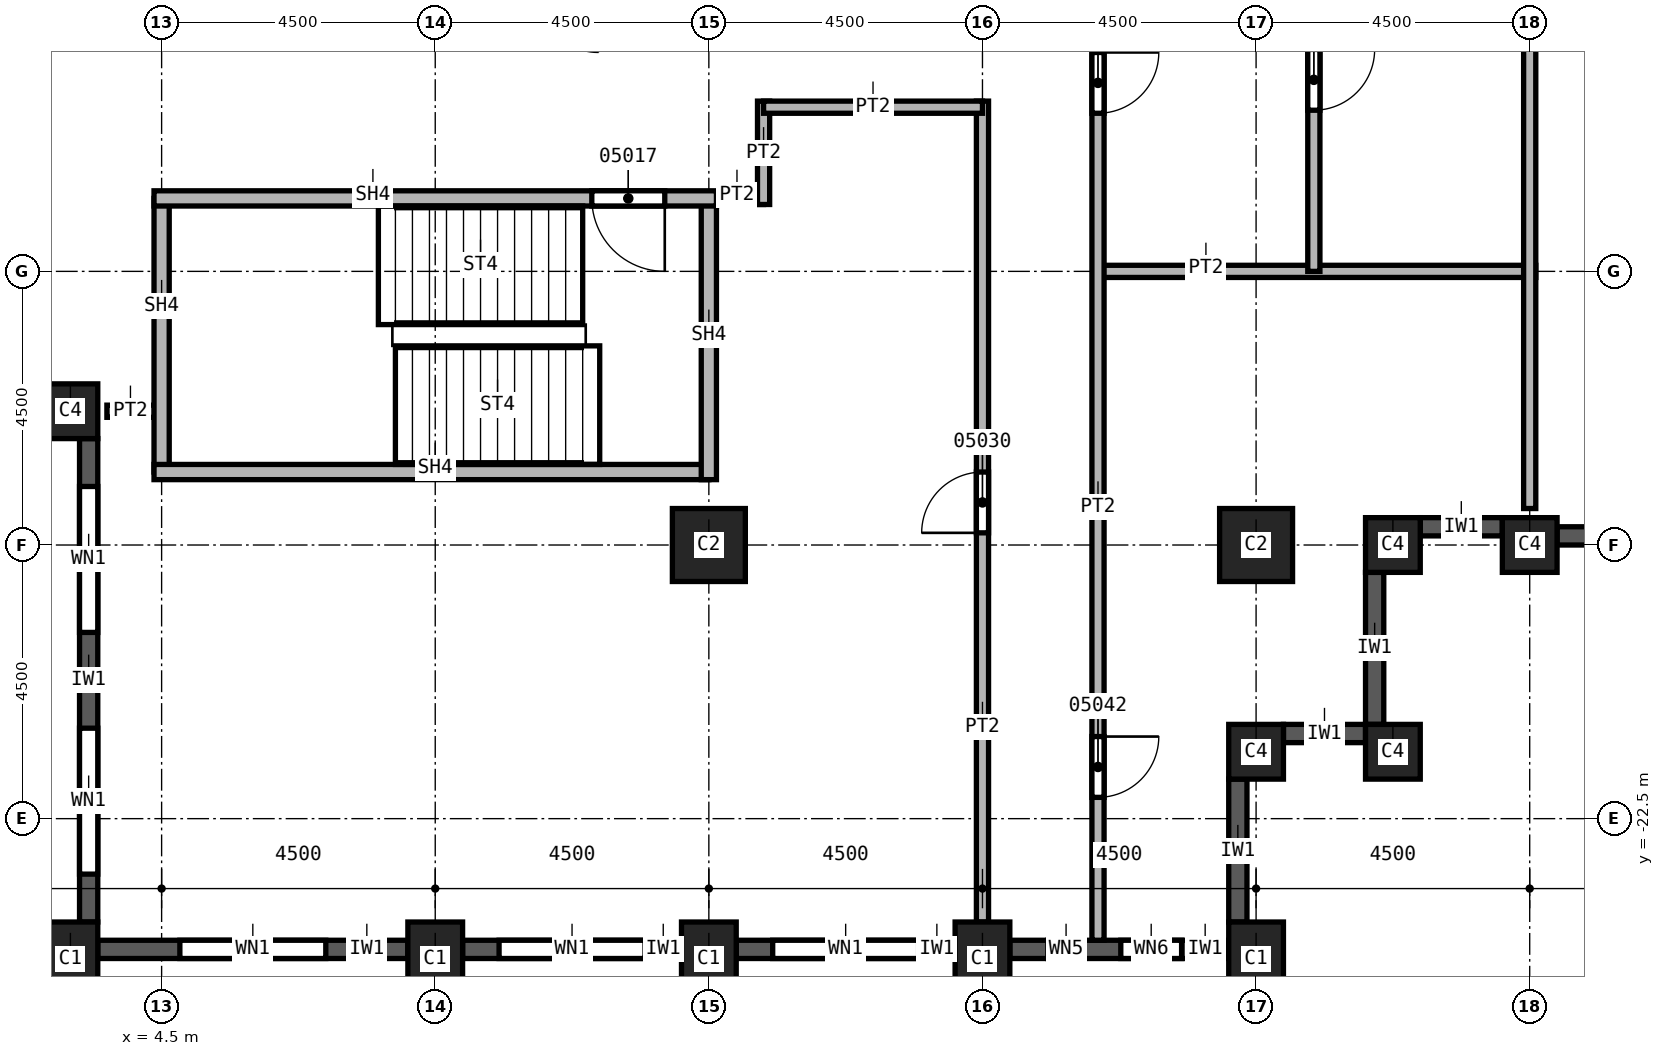
"""IFC4 building model, lengths in metres.
Left out: names, types, materials, properties, quantities, classifications, styles, units other than length and angle.
Written with IfcOpenShell. Run it as: python <this file> out.ifc"""

import sys

from ifc_helpers import new_model, si_unit, direction, frame, frame_2d, origin, origin_2d, place, context, subcontext, project, spatial, rectangle, extrude, element, fill, save


model = new_model("IFC4")
c1 = context("Model", 3, precision=1e-05, world=origin(), true_north=direction((0.0, 1.0)))
c2 = subcontext(c1, "Body", "Model", "MODEL_VIEW")
j1 = project(units=[si_unit("LENGTHUNIT", "METRE"), si_unit("PLANEANGLEUNIT", "RADIAN")], contexts=[c1])
p1 = place(None, origin())
s1 = spatial("IfcSite", under=j1, at=p1, CompositionType="ELEMENT")
p2 = place(p1, origin())
s2 = spatial("IfcBuilding", under=s1, at=p2, CompositionType="ELEMENT")
p3 = place(p2, frame((0.0, 0.0, 112.0)))
s3 = spatial("IfcBuildingStorey", under=s2, at=p3, CompositionType="ELEMENT", Elevation=112.0)
for number, where, z_axis, x_axis in (
    (1, (13.5, -18.0, 0.0), (0.0, 0.0, 1.0), (1.0, 0.0, 0.0)),
    (2, (22.5, -18.0, 0.0), (0.0, 0.0, 1.0), (1.0, 0.0, 0.0)),
):
    element("IfcColumn", number, at=place(p3, frame(where, z_axis=z_axis, x_axis=x_axis)), inside=s3, PredefinedType="COLUMN", context=c2, shape_type="SweptSolid", body=[
        extrude(rectangle(XDim=1.2, YDim=1.2, at=origin_2d()), origin(), (0.0, 0.0, 1.0), 3.7),
    ])
p4 = place(p3, frame((27.0, -18.0, 0.0), z_axis=(0.0, 0.0, 1.0), x_axis=(1.0, 0.0, 0.0)))
e3 = element("IfcColumn", 3, at=p4, inside=s3, PredefinedType="COLUMN", context=c2, shape_type="SweptSolid", body=[
    extrude(rectangle(XDim=0.9, YDim=0.9, at=origin_2d()), origin(), (0.0, 0.0, 1.0), 3.7),
])
for number, where, z_axis, x_axis in (
    (4, (3.0, -24.8, 0.0), (0.0, 0.0, 1.0), (1.0, 0.0, 0.0)),
    (5, (9.0, -24.8, 0.0), (0.0, 0.0, 1.0), (1.0, 0.0, 0.0)),
    (6, (13.5, -24.8, 0.0), (0.0, 0.0, 1.0), (1.0, 0.0, 0.0)),
    (7, (18.0, -24.8, 0.0), (0.0, 0.0, 1.0), (1.0, 0.0, 0.0)),
    (8, (22.5, -24.8, 0.0), (0.0, 0.0, 1.0), (1.0, 0.0, 0.0)),
):
    element("IfcColumn", number, at=place(p3, frame(where, z_axis=z_axis, x_axis=x_axis)), inside=s3, PredefinedType="COLUMN", context=c2, shape_type="SweptSolid", body=[
        extrude(rectangle(XDim=0.9, YDim=1.2, at=origin_2d()), origin(), (0.0, 0.0, 1.0), 3.7),
    ])
for number, where, z_axis, x_axis in (
    (9, (3.0, -15.8, 0.0), (0.0, 0.0, 1.0), (1.0, 0.0, 0.0)),
    (10, (22.5, -21.4, 0.0), (0.0, 0.0, 1.0), (1.0, 0.0, 0.0)),
    (11, (24.75, -21.4, 0.0), (0.0, 0.0, 1.0), (1.0, 0.0, 0.0)),
    (12, (24.75, -18.0, 0.0), (0.0, 0.0, 1.0), (1.0, 0.0, 0.0)),
):
    element("IfcColumn", number, at=place(p3, frame(where, z_axis=z_axis, x_axis=x_axis)), inside=s3, PredefinedType="COLUMN", context=c2, shape_type="SweptSolid", body=[
        extrude(rectangle(XDim=0.9, YDim=0.9, at=origin_2d()), origin(), (0.0, 0.0, 1.0), 3.7),
    ])
p5 = place(p3, frame((3.3, -16.25, 0.0), z_axis=(0.0, 0.0, 1.0), x_axis=(0.0, -1.0, 0.0)))
e13 = element("IfcWall", 13, at=p5, inside=s3, PredefinedType="SOLIDWALL", context=c2, shape_type="SweptSolid", body=[
    extrude(rectangle(XDim=7.95, YDim=0.3, at=frame_2d((3.975, 0.0))), origin(), (0.0, 0.0, 1.0), 3.1),
])
p6 = place(p5, frame((0.788, 0.0, 0.8)))
e14 = element("IfcOpeningElement", 14, at=p6, cuts=e13, PredefinedType="OPENING", context=c2, shape_type="SweptSolid", body=[
    extrude(rectangle(XDim=2.4, YDim=1.95, at=frame_2d((1.2, 0.975))), frame((0.0, 0.15, 0.0), z_axis=(0.0, -1.0, 0.0), x_axis=(1.0, 0.0, 0.0)), (0.0, 0.0, 1.0), 0.3),
])
p7 = place(p5, frame((4.762, 0.0, 0.8)))
e15 = element("IfcOpeningElement", 15, at=p7, cuts=e13, PredefinedType="OPENING", context=c2, shape_type="SweptSolid", body=[
    extrude(rectangle(XDim=2.4, YDim=1.95, at=frame_2d((1.2, 0.975))), frame((0.0, 0.15, 0.0), z_axis=(0.0, -1.0, 0.0), x_axis=(1.0, 0.0, 0.0)), (0.0, 0.0, 1.0), 0.3),
])
p8 = place(p3, frame((3.45, -24.65, 0.0), z_axis=(0.0, 0.0, 1.0), x_axis=(1.0, 0.0, 0.0)))
e16 = element("IfcWall", 16, at=p8, inside=s3, PredefinedType="SOLIDWALL", context=c2, shape_type="SweptSolid", body=[
    extrude(rectangle(XDim=5.1, YDim=0.3, at=frame_2d((2.55, 0.0))), origin(), (0.0, 0.0, 1.0), 3.1),
])
p9 = place(p8, frame((1.35, 0.0, 0.8)))
e17 = element("IfcOpeningElement", 17, at=p9, cuts=e16, PredefinedType="OPENING", context=c2, shape_type="SweptSolid", body=[
    extrude(rectangle(XDim=2.4, YDim=1.95, at=frame_2d((1.2, 0.975))), frame((0.0, 0.15, 0.0), z_axis=(0.0, -1.0, 0.0), x_axis=(1.0, 0.0, 0.0)), (0.0, 0.0, 1.0), 0.3),
])
p10 = place(p3, frame((9.45, -24.65, 0.0), z_axis=(0.0, 0.0, 1.0), x_axis=(1.0, 0.0, 0.0)))
e18 = element("IfcWall", 18, at=p10, inside=s3, PredefinedType="SOLIDWALL", context=c2, shape_type="SweptSolid", body=[
    extrude(rectangle(XDim=3.6, YDim=0.3, at=frame_2d((1.8, 0.0))), origin(), (0.0, 0.0, 1.0), 3.1),
])
p11 = place(p10, frame((0.6, 0.0, 0.8)))
e19 = element("IfcOpeningElement", 19, at=p11, cuts=e18, PredefinedType="OPENING", context=c2, shape_type="SweptSolid", body=[
    extrude(rectangle(XDim=2.4, YDim=1.95, at=frame_2d((1.2, 0.975))), frame((0.0, 0.15, 0.0), z_axis=(0.0, -1.0, 0.0), x_axis=(1.0, 0.0, 0.0)), (0.0, 0.0, 1.0), 0.3),
])
p12 = place(p3, frame((13.95, -24.65, 0.0), z_axis=(0.0, 0.0, 1.0), x_axis=(1.0, 0.0, 0.0)))
e20 = element("IfcWall", 20, at=p12, inside=s3, PredefinedType="SOLIDWALL", context=c2, shape_type="SweptSolid", body=[
    extrude(rectangle(XDim=3.6, YDim=0.3, at=frame_2d((1.8, 0.0))), origin(), (0.0, 0.0, 1.0), 3.1),
])
p13 = place(p12, frame((0.6, 0.0, 0.8)))
e21 = element("IfcOpeningElement", 21, at=p13, cuts=e20, PredefinedType="OPENING", context=c2, shape_type="SweptSolid", body=[
    extrude(rectangle(XDim=2.4, YDim=1.95, at=frame_2d((1.2, 0.975))), frame((0.0, 0.15, 0.0), z_axis=(0.0, -1.0, 0.0), x_axis=(1.0, 0.0, 0.0)), (0.0, 0.0, 1.0), 0.3),
])
p14 = place(p3, frame((18.45, -24.65, 0.0), z_axis=(0.0, 0.0, 1.0), x_axis=(1.0, 0.0, 0.0)))
e22 = element("IfcWall", 22, at=p14, inside=s3, PredefinedType="SOLIDWALL", context=c2, shape_type="SweptSolid", body=[
    extrude(rectangle(XDim=3.6, YDim=0.3, at=frame_2d((1.8, 0.0))), origin(), (0.0, 0.0, 1.0), 3.1),
])
p15 = place(p14, frame((0.625, 0.0, 0.8)))
e23 = element("IfcOpeningElement", 23, at=p15, cuts=e22, PredefinedType="OPENING", context=c2, shape_type="SweptSolid", body=[
    extrude(rectangle(XDim=0.6, YDim=1.95, at=frame_2d((0.3, 0.975))), frame((0.0, 0.15, 0.0), z_axis=(0.0, -1.0, 0.0), x_axis=(1.0, 0.0, 0.0)), (0.0, 0.0, 1.0), 0.3),
])
p16 = place(p14, frame((1.825, 0.0, 0.8)))
e24 = element("IfcOpeningElement", 24, at=p16, cuts=e22, PredefinedType="OPENING", context=c2, shape_type="SweptSolid", body=[
    extrude(rectangle(XDim=1.0, YDim=1.95, at=frame_2d((0.5, 0.975))), frame((0.0, 0.15, 0.0), z_axis=(0.0, -1.0, 0.0), x_axis=(1.0, 0.0, 0.0)), (0.0, 0.0, 1.0), 0.3),
])
p17 = place(p3, frame((22.2, -24.2, 0.0), z_axis=(0.0, 0.0, 1.0), x_axis=(0.0, 1.0, 0.0)))
e25 = element("IfcWall", 25, at=p17, inside=s3, PredefinedType="SOLIDWALL", context=c2, shape_type="SweptSolid", body=[
    extrude(rectangle(XDim=2.35, YDim=0.3, at=frame_2d((1.175, 0.0))), origin(), (0.0, 0.0, 1.0), 3.1),
])
p18 = place(p3, frame((22.95, -21.1, 0.0), z_axis=(0.0, 0.0, 1.0), x_axis=(1.0, 0.0, 0.0)))
e26 = element("IfcWall", 26, at=p18, inside=s3, PredefinedType="SOLIDWALL", context=c2, shape_type="SweptSolid", body=[
    extrude(rectangle(XDim=1.35, YDim=0.3, at=frame_2d((0.675, 0.0))), origin(), (0.0, 0.0, 1.0), 3.1),
])
p19 = place(p3, frame((24.45, -20.95, 0.0), z_axis=(0.0, 0.0, 1.0), x_axis=(0.0, 1.0, 0.0)))
e27 = element("IfcWall", 27, at=p19, inside=s3, PredefinedType="SOLIDWALL", context=c2, shape_type="SweptSolid", body=[
    extrude(rectangle(XDim=2.5, YDim=0.3, at=frame_2d((1.25, 0.0))), origin(), (0.0, 0.0, 1.0), 3.1),
])
p20 = place(p3, frame((25.2, -17.7, 0.0), z_axis=(0.0, 0.0, 1.0), x_axis=(1.0, 0.0, 0.0)))
e28 = element("IfcWall", 28, at=p20, inside=s3, PredefinedType="SOLIDWALL", context=c2, shape_type="SweptSolid", body=[
    extrude(rectangle(XDim=1.35, YDim=0.3, at=frame_2d((0.675, 0.0))), origin(), (0.0, 0.0, 1.0), 3.1),
])
p21 = place(p3, frame((27.45, -17.85, 0.0), z_axis=(0.0, 0.0, 1.0), x_axis=(1.0, 0.0, 0.0)))
e29 = element("IfcWall", 29, at=p21, inside=s3, PredefinedType="SOLIDWALL", context=c2, shape_type="SweptSolid", body=[
    extrude(rectangle(XDim=3.6, YDim=0.3, at=frame_2d((1.8, 0.0))), origin(), (0.0, 0.0, 1.0), 3.1),
])
p22 = place(p21, frame((0.6, 0.0, 0.8)))
e30 = element("IfcOpeningElement", 30, at=p22, cuts=e29, PredefinedType="OPENING", context=c2, shape_type="SweptSolid", body=[
    extrude(rectangle(XDim=2.4, YDim=1.95, at=frame_2d((1.2, 0.975))), frame((0.0, 0.15, 0.0), z_axis=(0.0, -1.0, 0.0), x_axis=(1.0, 0.0, 0.0)), (0.0, 0.0, 1.0), 0.3),
])
p23 = place(p3, frame((4.5, -15.8, 0.0), z_axis=(0.0, 0.0, 1.0), x_axis=(-1.0, 0.0, 0.0)))
e31 = element("IfcWall", 31, at=p23, inside=s3, PredefinedType="PARTITIONING", context=c2, shape_type="SweptSolid", body=[
    extrude(rectangle(XDim=0.9, YDim=0.2, at=frame_2d((0.45, 0.0))), origin(), (0.0, 0.0, 1.0), 3.7),
])
p24 = place(p3, frame((14.4, -12.3, 0.0), z_axis=(0.0, 0.0, 1.0), x_axis=(-1.0, 0.0, 0.0)))
e32 = element("IfcWall", 32, at=p24, inside=s3, PredefinedType="PARTITIONING", context=c2, shape_type="SweptSolid", body=[
    extrude(rectangle(XDim=1.025, YDim=0.2, at=frame_2d((0.512, 0.0))), origin(), (0.0, 0.0, 1.0), 3.7),
])
p25 = place(p3, frame((14.4, -10.7, 0.0), z_axis=(0.0, 0.0, 1.0), x_axis=(0.0, -1.0, 0.0)))
e33 = element("IfcWall", 33, at=p25, inside=s3, PredefinedType="PARTITIONING", context=c2, shape_type="SweptSolid", body=[
    extrude(rectangle(XDim=1.7, YDim=0.2, at=frame_2d((0.85, 0.0))), origin(), (0.0, 0.0, 1.0), 3.7),
])
p26 = place(p3, frame((18.0, -24.2, 0.0), z_axis=(0.0, 0.0, 1.0), x_axis=(0.0, 1.0, 0.0)))
e34 = element("IfcWall", 34, at=p26, inside=s3, PredefinedType="PARTITIONING", context=c2, shape_type="SweptSolid", body=[
    extrude(rectangle(XDim=13.5, YDim=0.2, at=frame_2d((6.75, 0.0))), origin(), (0.0, 0.0, 1.0), 3.7),
])
p27 = place(p26, frame((6.4, 0.0, 0.0)))
e35 = element("IfcOpeningElement", 35, at=p27, cuts=e34, PredefinedType="OPENING", context=c2, shape_type="SweptSolid", body=[
    extrude(rectangle(XDim=1.0, YDim=2.1, at=frame_2d((0.5, 1.05))), frame((0.0, 0.1, 0.0), z_axis=(0.0, -1.0, 0.0), x_axis=(1.0, 0.0, 0.0)), (0.0, 0.0, 1.0), 0.2),
])
p28 = place(p3, frame((18.0, -10.8, 0.0), z_axis=(0.0, 0.0, 1.0), x_axis=(-1.0, 0.0, 0.0)))
e36 = element("IfcWall", 36, at=p28, inside=s3, PredefinedType="PARTITIONING", context=c2, shape_type="SweptSolid", body=[
    extrude(rectangle(XDim=3.6, YDim=0.2, at=frame_2d((1.8, 0.0))), origin(), (0.0, 0.0, 1.0), 3.7),
])
p29 = place(p3, frame((19.9, -13.5, 0.0), z_axis=(0.0, 0.0, 1.0), x_axis=(1.0, 0.0, 0.0)))
e37 = element("IfcWall", 37, at=p29, inside=s3, PredefinedType="PARTITIONING", context=c2, shape_type="SweptSolid", body=[
    extrude(rectangle(XDim=7.2, YDim=0.2, at=frame_2d((3.6, 0.0))), origin(), (0.0, 0.0, 1.0), 3.7),
])
p30 = place(p3, frame((19.9, -3.65, 0.0), z_axis=(0.0, 0.0, 1.0), x_axis=(0.0, -1.0, 0.0)))
e38 = element("IfcWall", 38, at=p30, inside=s3, PredefinedType="PARTITIONING", context=c2, shape_type="SweptSolid", body=[
    extrude(rectangle(XDim=20.85, YDim=0.2, at=frame_2d((10.425, 0.0))), origin(), (0.0, 0.0, 1.0), 3.7),
])
p31 = place(p30, frame((17.5, 0.0, 0.0)))
e39 = element("IfcOpeningElement", 39, at=p31, cuts=e38, PredefinedType="OPENING", context=c2, shape_type="SweptSolid", body=[
    extrude(rectangle(XDim=1.0, YDim=2.1, at=frame_2d((0.5, 1.05))), frame((0.0, 0.1, 0.0), z_axis=(0.0, -1.0, 0.0), x_axis=(1.0, 0.0, 0.0)), (0.0, 0.0, 1.0), 0.2),
])
p32 = place(p30, frame((6.25, 0.0, 0.0)))
e40 = element("IfcOpeningElement", 40, at=p32, cuts=e38, PredefinedType="OPENING", context=c2, shape_type="SweptSolid", body=[
    extrude(rectangle(XDim=1.0, YDim=2.1, at=frame_2d((0.5, 1.05))), frame((0.0, 0.1, 0.0), z_axis=(0.0, -1.0, 0.0), x_axis=(1.0, 0.0, 0.0)), (0.0, 0.0, 1.0), 0.2),
])
p33 = place(p3, frame((23.45, -3.75, 0.0), z_axis=(0.0, 0.0, 1.0), x_axis=(0.0, -1.0, 0.0)))
e41 = element("IfcWall", 41, at=p33, inside=s3, PredefinedType="PARTITIONING", context=c2, shape_type="SweptSolid", body=[
    extrude(rectangle(XDim=9.75, YDim=0.2, at=frame_2d((4.875, 0.0))), origin(), (0.0, 0.0, 1.0), 3.7),
])
p34 = place(p33, frame((6.1, 0.0, 0.0)))
e42 = element("IfcOpeningElement", 42, at=p34, cuts=e41, PredefinedType="OPENING", context=c2, shape_type="SweptSolid", body=[
    extrude(rectangle(XDim=1.0, YDim=2.1, at=frame_2d((0.5, 1.05))), frame((0.0, 0.1, 0.0), z_axis=(0.0, -1.0, 0.0), x_axis=(1.0, 0.0, 0.0)), (0.0, 0.0, 1.0), 0.2),
])
p35 = place(p3, frame((27.0, -3.75, 0.0), z_axis=(0.0, 0.0, 1.0), x_axis=(0.0, -1.0, 0.0)))
e43 = element("IfcWall", 43, at=p35, inside=s3, PredefinedType="PARTITIONING", context=c2, shape_type="SweptSolid", body=[
    extrude(rectangle(XDim=13.65, YDim=0.2, at=frame_2d((6.825, 0.0))), origin(), (0.0, 0.0, 1.0), 3.7),
])
p36 = place(p3, frame((4.5, -16.8, 0.0), z_axis=(0.0, 0.0, 1.0), x_axis=(0.0, 1.0, 0.0)))
e44 = element("IfcWall", 44, at=p36, inside=s3, PredefinedType="SOLIDWALL", context=c2, shape_type="SweptSolid", body=[
    extrude(rectangle(XDim=4.5, YDim=0.25, at=frame_2d((2.25, 0.0))), origin(), (0.0, 0.0, 1.0), 3.7),
])
p37 = place(p3, frame((13.5, -16.8, 0.0), z_axis=(0.0, 0.0, 1.0), x_axis=(-1.0, 0.0, 0.0)))
e45 = element("IfcWall", 45, at=p37, inside=s3, PredefinedType="SOLIDWALL", context=c2, shape_type="SweptSolid", body=[
    extrude(rectangle(XDim=9.125, YDim=0.25, at=frame_2d((4.562, 0.0))), origin(), (0.0, 0.0, 1.0), 3.7),
])
p38 = place(p3, frame((13.5, -12.3, 0.0), z_axis=(0.0, 0.0, 1.0), x_axis=(0.0, -1.0, 0.0)))
e46 = element("IfcWall", 46, at=p38, inside=s3, PredefinedType="SOLIDWALL", context=c2, shape_type="SweptSolid", body=[
    extrude(rectangle(XDim=4.625, YDim=0.25, at=frame_2d((2.312, 0.0))), origin(), (0.0, 0.0, 1.0), 3.7),
])
p39 = place(p3, frame((13.625, -12.3, 0.0), z_axis=(0.0, 0.0, 1.0), x_axis=(-1.0, 0.0, 0.0)))
e47 = element("IfcWall", 47, at=p39, inside=s3, PredefinedType="SOLIDWALL", context=c2, shape_type="SweptSolid", body=[
    extrude(rectangle(XDim=9.25, YDim=0.25, at=frame_2d((4.625, 0.0))), origin(), (0.0, 0.0, 1.0), 3.7),
])
p40 = place(p39, frame((0.85, 0.0, 0.0)))
e48 = element("IfcOpeningElement", 48, at=p40, cuts=e47, PredefinedType="OPENING", context=c2, shape_type="SweptSolid", body=[
    extrude(rectangle(XDim=1.2, YDim=2.1, at=frame_2d((0.6, 1.05))), frame((0.0, 0.125, 0.0), z_axis=(0.0, -1.0, 0.0), x_axis=(1.0, 0.0, 0.0)), (0.0, 0.0, 1.0), 0.25),
])
p41 = place(p6, origin())
e49 = element("IfcWindow", 49, at=p41, inside=s3, PartitioningType="SINGLE_PANEL", PredefinedType="WINDOW", context=c2, shape_type="SweptSolid", body=[
    extrude(rectangle(XDim=2.4, YDim=1.95, at=frame_2d((1.2, 0.975))), frame((0.0, 0.03, 0.0), z_axis=(0.0, -1.0, 0.0), x_axis=(1.0, 0.0, 0.0)), (0.0, 0.0, 1.0), 0.06),
])
fill(e14, e49)
p42 = place(p7, origin())
e50 = element("IfcWindow", 50, at=p42, inside=s3, PartitioningType="SINGLE_PANEL", PredefinedType="WINDOW", context=c2, shape_type="SweptSolid", body=[
    extrude(rectangle(XDim=2.4, YDim=1.95, at=frame_2d((1.2, 0.975))), frame((0.0, 0.03, 0.0), z_axis=(0.0, -1.0, 0.0), x_axis=(1.0, 0.0, 0.0)), (0.0, 0.0, 1.0), 0.06),
])
fill(e15, e50)
p43 = place(p9, origin())
e51 = element("IfcWindow", 51, at=p43, inside=s3, PartitioningType="SINGLE_PANEL", PredefinedType="WINDOW", context=c2, shape_type="SweptSolid", body=[
    extrude(rectangle(XDim=2.4, YDim=1.95, at=frame_2d((1.2, 0.975))), frame((0.0, 0.03, 0.0), z_axis=(0.0, -1.0, 0.0), x_axis=(1.0, 0.0, 0.0)), (0.0, 0.0, 1.0), 0.06),
])
fill(e17, e51)
p44 = place(p11, origin())
e52 = element("IfcWindow", 52, at=p44, inside=s3, PartitioningType="SINGLE_PANEL", PredefinedType="WINDOW", context=c2, shape_type="SweptSolid", body=[
    extrude(rectangle(XDim=2.4, YDim=1.95, at=frame_2d((1.2, 0.975))), frame((0.0, 0.03, 0.0), z_axis=(0.0, -1.0, 0.0), x_axis=(1.0, 0.0, 0.0)), (0.0, 0.0, 1.0), 0.06),
])
fill(e19, e52)
p45 = place(p13, origin())
e53 = element("IfcWindow", 53, at=p45, inside=s3, PartitioningType="SINGLE_PANEL", PredefinedType="WINDOW", context=c2, shape_type="SweptSolid", body=[
    extrude(rectangle(XDim=2.4, YDim=1.95, at=frame_2d((1.2, 0.975))), frame((0.0, 0.03, 0.0), z_axis=(0.0, -1.0, 0.0), x_axis=(1.0, 0.0, 0.0)), (0.0, 0.0, 1.0), 0.06),
])
fill(e21, e53)
p46 = place(p40, origin())
e54 = element("IfcDoor", 54, at=p46, inside=s3, OperationType="SINGLE_SWING_RIGHT", PredefinedType="DOOR", context=c2, shape_type="SweptSolid", body=[
    extrude(rectangle(XDim=1.2, YDim=2.1, at=frame_2d((0.6, 1.05))), frame((0.0, 0.025, 0.0), z_axis=(0.0, -1.0, 0.0), x_axis=(1.0, 0.0, 0.0)), (0.0, 0.0, 1.0), 0.05),
])
fill(e48, e54)
p47 = place(p27, origin())
e55 = element("IfcDoor", 55, at=p47, inside=s3, OperationType="SINGLE_SWING_LEFT", PredefinedType="DOOR", context=c2, shape_type="SweptSolid", body=[
    extrude(rectangle(XDim=1.0, YDim=2.1, at=frame_2d((0.5, 1.05))), frame((0.0, 0.025, 0.0), z_axis=(0.0, -1.0, 0.0), x_axis=(1.0, 0.0, 0.0)), (0.0, 0.0, 1.0), 0.05),
])
fill(e35, e55)
p48 = place(p31, origin())
e56 = element("IfcDoor", 56, at=p48, inside=s3, OperationType="SINGLE_SWING_LEFT", PredefinedType="DOOR", context=c2, shape_type="SweptSolid", body=[
    extrude(rectangle(XDim=1.0, YDim=2.1, at=frame_2d((0.5, 1.05))), frame((0.0, 0.025, 0.0), z_axis=(0.0, -1.0, 0.0), x_axis=(1.0, 0.0, 0.0)), (0.0, 0.0, 1.0), 0.05),
])
fill(e39, e56)
p49 = place(p32, origin())
e57 = element("IfcDoor", 57, at=p49, inside=s3, OperationType="SINGLE_SWING_RIGHT", PredefinedType="DOOR", context=c2, shape_type="SweptSolid", body=[
    extrude(rectangle(XDim=1.0, YDim=2.1, at=frame_2d((0.5, 1.05))), frame((0.0, 0.025, 0.0), z_axis=(0.0, -1.0, 0.0), x_axis=(1.0, 0.0, 0.0)), (0.0, 0.0, 1.0), 0.05),
])
fill(e40, e57)
p50 = place(p34, origin())
e58 = element("IfcDoor", 58, at=p50, inside=s3, OperationType="SINGLE_SWING_LEFT", PredefinedType="DOOR", context=c2, shape_type="SweptSolid", body=[
    extrude(rectangle(XDim=1.0, YDim=2.1, at=frame_2d((0.5, 1.05))), frame((0.0, 0.025, 0.0), z_axis=(0.0, -1.0, 0.0), x_axis=(1.0, 0.0, 0.0)), (0.0, 0.0, 1.0), 0.05),
])
fill(e42, e58)
p51 = place(p15, origin())
e59 = element("IfcWindow", 59, at=p51, inside=s3, PartitioningType="SINGLE_PANEL", PredefinedType="WINDOW", context=c2, shape_type="SweptSolid", body=[
    extrude(rectangle(XDim=0.6, YDim=1.95, at=frame_2d((0.3, 0.975))), frame((0.0, 0.03, 0.0), z_axis=(0.0, -1.0, 0.0), x_axis=(1.0, 0.0, 0.0)), (0.0, 0.0, 1.0), 0.06),
])
fill(e23, e59)
p52 = place(p16, origin())
e60 = element("IfcWindow", 60, at=p52, inside=s3, PartitioningType="SINGLE_PANEL", PredefinedType="WINDOW", context=c2, shape_type="SweptSolid", body=[
    extrude(rectangle(XDim=1.0, YDim=1.95, at=frame_2d((0.5, 0.975))), frame((0.0, 0.03, 0.0), z_axis=(0.0, -1.0, 0.0), x_axis=(1.0, 0.0, 0.0)), (0.0, 0.0, 1.0), 0.06),
])
fill(e24, e60)
save(model, sys.argv[1])
